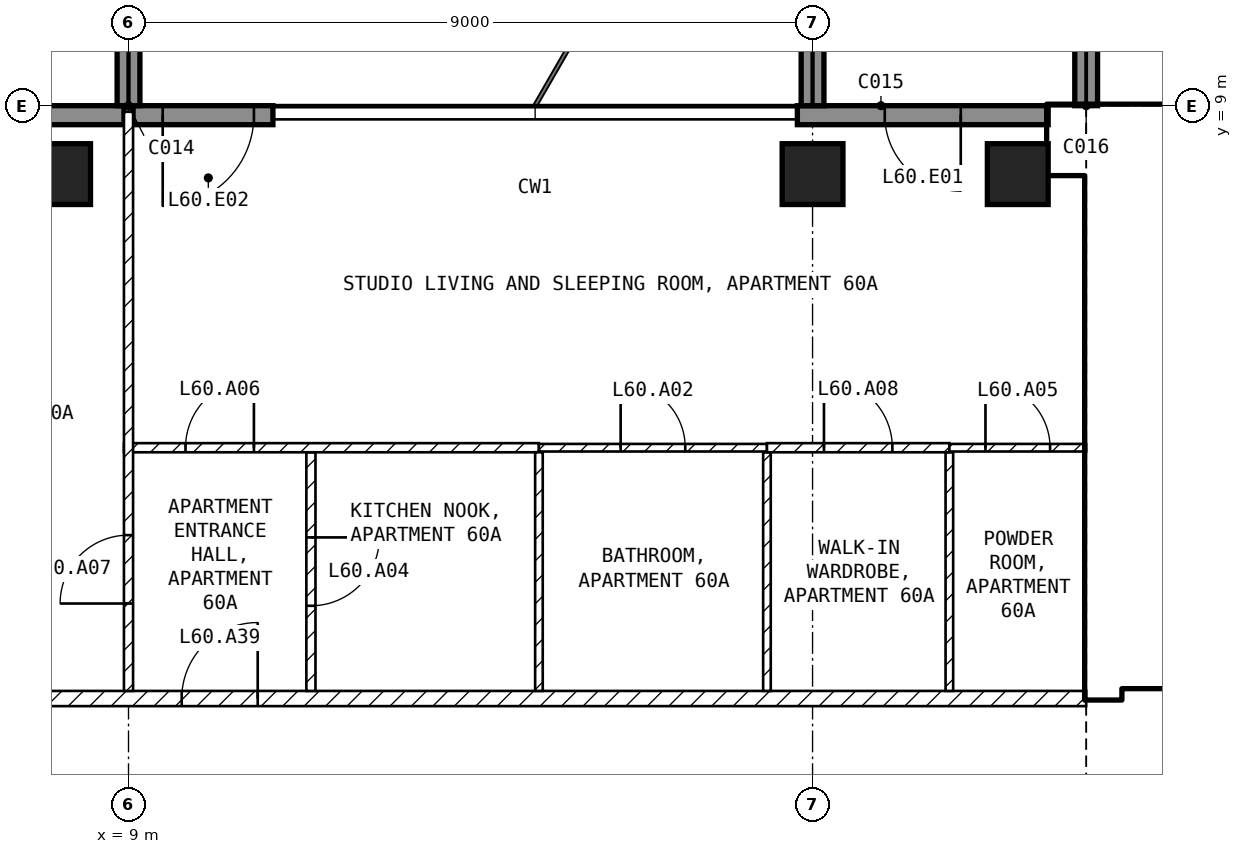
"""IFC4 building model, lengths in metres.
Left out: names, types, materials, properties, quantities, classifications, styles, units other than length and angle.
Written with IfcOpenShell. Run it as: python <this file> out.ifc"""

import sys

from ifc_helpers import new_model, si_unit, direction, frame, frame_2d, origin, origin_2d, place, context, subcontext, project, spatial, rectangle, extrude, element, fill, save


model = new_model("IFC4")
c1 = context("Model", 3, precision=1e-05, world=origin(), true_north=direction((0.0, 1.0)))
c2 = subcontext(c1, "Body", "Model", "MODEL_VIEW")
j1 = project(units=[si_unit("LENGTHUNIT", "METRE"), si_unit("PLANEANGLEUNIT", "RADIAN")], contexts=[c1])
p1 = place(None, origin())
s1 = spatial("IfcSite", under=j1, at=p1, CompositionType="ELEMENT")
p2 = place(p1, origin())
s2 = spatial("IfcBuilding", under=s1, at=p2, CompositionType="ELEMENT")
p3 = place(p2, frame((0.0, 0.0, 239.5)))
s3 = spatial("IfcBuildingStorey", under=s2, at=p3, CompositionType="ELEMENT", Elevation=239.5)
for number, where, z_axis, x_axis in (
    (1, (8.1, 8.1, -0.25), (0.0, 0.0, 1.0), (1.0, 0.0, 0.0)),
    (2, (18.0, 8.1, -0.25), (0.0, 0.0, 1.0), (1.0, 0.0, 0.0)),
    (3, (20.7, 8.1, -0.25), (0.0, 0.0, 1.0), (1.0, 0.0, 0.0)),
):
    element("IfcColumn", number, at=place(p3, frame(where, z_axis=z_axis, x_axis=x_axis)), inside=s3, PredefinedType="COLUMN", context=c2, shape_type="SweptSolid", body=[
        extrude(rectangle(XDim=0.8, YDim=0.8, at=origin_2d()), origin(), (0.0, 0.0, 1.0), 3.5),
    ])
p4 = place(p3, frame((21.1, 8.875, 0.0), z_axis=(0.0, 0.0, 1.0), x_axis=(-1.0, 0.0, 0.0)))
e4 = element("IfcWall", 4, at=p4, inside=s3, PredefinedType="SOLIDWALL", context=c2, shape_type="SweptSolid", body=[
    extrude(rectangle(XDim=3.3, YDim=0.25, at=frame_2d((1.65, 0.0))), origin(), (0.0, 0.0, 1.0), 3.25),
])
p5 = place(p4, frame((1.15, 0.0, 0.0)))
e5 = element("IfcOpeningElement", 5, at=p5, cuts=e4, PredefinedType="OPENING", context=c2, shape_type="SweptSolid", body=[
    extrude(rectangle(XDim=1.0, YDim=2.4, at=frame_2d((0.5, 1.2))), frame((0.0, 0.135, 0.0), z_axis=(0.0, -1.0, 0.0), x_axis=(1.0, 0.0, 0.0)), (0.0, 0.0, 1.0), 0.27),
])
p6 = place(p3, frame((10.9, 8.875, 0.0), z_axis=(0.0, 0.0, 1.0), x_axis=(-1.0, 0.0, 0.0)))
e6 = element("IfcWall", 6, at=p6, inside=s3, PredefinedType="SOLIDWALL", context=c2, shape_type="SweptSolid", body=[
    extrude(rectangle(XDim=1.84, YDim=0.25, at=frame_2d((0.92, 0.0))), origin(), (0.0, 0.0, 1.0), 3.25),
])
p7 = place(p6, frame((0.25, 0.0, 0.0)))
e7 = element("IfcOpeningElement", 7, at=p7, cuts=e6, PredefinedType="OPENING", context=c2, shape_type="SweptSolid", body=[
    extrude(rectangle(XDim=1.2, YDim=2.4, at=frame_2d((0.6, 1.2))), frame((0.0, 0.135, 0.0), z_axis=(0.0, -1.0, 0.0), x_axis=(1.0, 0.0, 0.0)), (0.0, 0.0, 1.0), 0.27),
])
p8 = place(p3, frame((8.94, 8.875, 0.0), z_axis=(0.0, 0.0, 1.0), x_axis=(-1.0, 0.0, 0.0)))
e8 = element("IfcWall", 8, at=p8, inside=s3, PredefinedType="SOLIDWALL", context=c2, shape_type="SweptSolid", body=[
    extrude(rectangle(XDim=3.04, YDim=0.25, at=frame_2d((1.52, 0.0))), origin(), (0.0, 0.0, 1.0), 3.25),
])
p9 = place(p8, frame((1.59, 0.0, 0.0)))
e9 = element("IfcOpeningElement", 9, at=p9, cuts=e8, PredefinedType="OPENING", context=c2, shape_type="SweptSolid", body=[
    extrude(rectangle(XDim=1.2, YDim=2.4, at=frame_2d((0.6, 1.2))), frame((0.0, 0.135, 0.0), z_axis=(0.0, -1.0, 0.0), x_axis=(1.0, 0.0, 0.0)), (0.0, 0.0, 1.0), 0.27),
])
for number, where, z_axis, x_axis in (
    (10, (9.0, 9.0, 0.0), (0.0, 0.0, 1.0), (0.0, 1.0, 0.0)),
    (11, (18.0, 9.0, 0.0), (0.0, 0.0, 1.0), (0.0, 1.0, 0.0)),
    (12, (21.6, 9.0, 0.0), (0.0, 0.0, 1.0), (0.0, 1.0, 0.0)),
):
    element("IfcWall", number, at=place(p3, frame(where, z_axis=z_axis, x_axis=x_axis)), inside=s3, PredefinedType="SOLIDWALL", context=c2, shape_type="SweptSolid", body=[
        extrude(rectangle(XDim=2.7, YDim=0.3, at=frame_2d((1.35, 0.0))), origin(), (0.0, 0.0, 1.0), 3.25),
    ])
p10 = place(p3, frame((21.1, 8.55, 0.0), z_axis=(0.0, 0.0, 1.0), x_axis=(1.0, 0.0, 0.0)))
e13 = element("IfcWall", 13, at=p10, inside=s3, PredefinedType="SHEAR", context=c2, shape_type="SweptSolid", body=[
    extrude(rectangle(XDim=8.65, YDim=0.9, at=frame_2d((4.325, 0.0))), origin(), (0.0, 0.0, 1.0), 3.25),
])
p11 = place(p3, frame((21.825, 1.2, 0.0), z_axis=(0.0, 0.0, 1.0), x_axis=(0.0, 1.0, 0.0)))
e14 = element("IfcWall", 14, at=p11, inside=s3, PredefinedType="SHEAR", context=c2, shape_type="SweptSolid", body=[
    extrude(rectangle(XDim=6.9, YDim=0.45, at=frame_2d((3.45, 0.0))), origin(), (0.0, 0.0, 1.0), 3.25),
])
p12 = place(p3, frame((22.05, 1.45, 0.0), z_axis=(0.0, 0.0, 1.0), x_axis=(1.0, 0.0, 0.0)))
e15 = element("IfcWall", 15, at=p12, inside=s3, PredefinedType="SOLIDWALL", context=c2, shape_type="SweptSolid", body=[
    extrude(rectangle(XDim=11.3, YDim=0.2, at=frame_2d((5.65, 0.0))), origin(), (0.0, 0.0, 1.0), 3.25),
])
p13 = place(p12, frame((0.75, 0.0, 0.0)))
e16 = element("IfcOpeningElement", 16, at=p13, cuts=e15, PredefinedType="OPENING", context=c2, shape_type="SweptSolid", body=[
    extrude(rectangle(XDim=1.0, YDim=2.1, at=frame_2d((0.5, 1.05))), frame((0.0, 0.11, 0.0), z_axis=(0.0, -1.0, 0.0), x_axis=(1.0, 0.0, 0.0)), (0.0, 0.0, 1.0), 0.22),
])
p14 = place(p12, frame((3.25, 0.0, 0.0)))
e17 = element("IfcOpeningElement", 17, at=p14, cuts=e15, PredefinedType="OPENING", context=c2, shape_type="SweptSolid", body=[
    extrude(rectangle(XDim=1.0, YDim=2.1, at=frame_2d((0.5, 1.05))), frame((0.0, 0.11, 0.0), z_axis=(0.0, -1.0, 0.0), x_axis=(1.0, 0.0, 0.0)), (0.0, 0.0, 1.0), 0.22),
])
p15 = place(p12, frame((9.225, 0.0, 0.0)))
e18 = element("IfcOpeningElement", 18, at=p15, cuts=e15, PredefinedType="OPENING", context=c2, shape_type="SweptSolid", body=[
    extrude(rectangle(XDim=0.9, YDim=2.1, at=frame_2d((0.45, 1.05))), frame((0.0, 0.11, 0.0), z_axis=(0.0, -1.0, 0.0), x_axis=(1.0, 0.0, 0.0)), (0.0, 0.0, 1.0), 0.22),
])
p16 = place(p3, frame((22.05, 5.15, 0.0), z_axis=(0.0, 0.0, 1.0), x_axis=(1.0, 0.0, 0.0)))
e19 = element("IfcWall", 19, at=p16, inside=s3, PredefinedType="SOLIDWALL", context=c2, shape_type="SweptSolid", body=[
    extrude(rectangle(XDim=6.3, YDim=0.2, at=frame_2d((3.15, 0.0))), origin(), (0.0, 0.0, 1.0), 3.25),
])
p17 = place(p16, frame((0.2, 0.0, 0.0)))
e20 = element("IfcOpeningElement", 20, at=p17, cuts=e19, PredefinedType="OPENING", context=c2, shape_type="SweptSolid", body=[
    extrude(rectangle(XDim=1.0, YDim=2.1, at=frame_2d((0.5, 1.05))), frame((0.0, 0.11, 0.0), z_axis=(0.0, -1.0, 0.0), x_axis=(1.0, 0.0, 0.0)), (0.0, 0.0, 1.0), 0.22),
])
p18 = place(p3, frame((4.4, 1.2, 0.0), z_axis=(0.0, 0.0, 1.0), x_axis=(1.0, 0.0, 0.0)))
e21 = element("IfcWall", 21, at=p18, inside=s3, PredefinedType="PARTITIONING", context=c2, shape_type="SweptSolid", body=[
    extrude(rectangle(XDim=17.2, YDim=0.2, at=frame_2d((8.6, 0.0))), origin(), (0.0, 0.0, 1.0), 3.25),
])
p19 = place(p18, frame((5.3, 0.0, 0.0)))
e22 = element("IfcOpeningElement", 22, at=p19, cuts=e21, PredefinedType="OPENING", context=c2, shape_type="SweptSolid", body=[
    extrude(rectangle(XDim=1.0, YDim=2.1, at=frame_2d((0.5, 1.05))), frame((0.0, 0.11, 0.0), z_axis=(0.0, -1.0, 0.0), x_axis=(1.0, 0.0, 0.0)), (0.0, 0.0, 1.0), 0.22),
])
p20 = place(p3, frame((11.4, 4.44, 0.0), z_axis=(0.0, 0.0, 1.0), x_axis=(0.0, -1.0, 0.0)))
e23 = element("IfcWall", 23, at=p20, inside=s3, PredefinedType="PARTITIONING", context=c2, shape_type="SweptSolid", body=[
    extrude(rectangle(XDim=3.14, YDim=0.12, at=frame_2d((1.57, 0.0))), origin(), (0.0, 0.0, 1.0), 3.25),
])
p21 = place(p20, frame((1.12, 0.0, 0.0)))
e24 = element("IfcOpeningElement", 24, at=p21, cuts=e23, PredefinedType="OPENING", context=c2, shape_type="SweptSolid", body=[
    extrude(rectangle(XDim=0.9, YDim=2.1, at=frame_2d((0.45, 1.05))), frame((0.0, 0.07, 0.0), z_axis=(0.0, -1.0, 0.0), x_axis=(1.0, 0.0, 0.0)), (0.0, 0.0, 1.0), 0.14),
])
p22 = place(p3, frame((8.94, 4.5, 0.0), z_axis=(0.0, 0.0, 1.0), x_axis=(1.0, 0.0, 0.0)))
e25 = element("IfcWall", 25, at=p22, inside=s3, PredefinedType="PARTITIONING", context=c2, shape_type="SweptSolid", body=[
    extrude(rectangle(XDim=5.46, YDim=0.12, at=frame_2d((2.73, 0.0))), origin(), (0.0, 0.0, 1.0), 3.25),
])
p23 = place(p22, frame((0.81, 0.0, 0.0)))
e26 = element("IfcOpeningElement", 26, at=p23, cuts=e25, PredefinedType="OPENING", context=c2, shape_type="SweptSolid", body=[
    extrude(rectangle(XDim=0.9, YDim=2.1, at=frame_2d((0.45, 1.05))), frame((0.0, 0.07, 0.0), z_axis=(0.0, -1.0, 0.0), x_axis=(1.0, 0.0, 0.0)), (0.0, 0.0, 1.0), 0.14),
])
p24 = place(p3, frame((9.0, 1.3, 0.0), z_axis=(0.0, 0.0, 1.0), x_axis=(0.0, 1.0, 0.0)))
e27 = element("IfcWall", 27, at=p24, inside=s3, PredefinedType="PARTITIONING", context=c2, shape_type="SweptSolid", body=[
    extrude(rectangle(XDim=7.62, YDim=0.12, at=frame_2d((3.81, 0.0))), origin(), (0.0, 0.0, 1.0), 3.25),
])
p25 = place(p24, frame((1.15, 0.0, 0.0)))
e28 = element("IfcOpeningElement", 28, at=p25, cuts=e27, PredefinedType="OPENING", context=c2, shape_type="SweptSolid", body=[
    extrude(rectangle(XDim=0.9, YDim=2.1, at=frame_2d((0.45, 1.05))), frame((0.0, 0.07, 0.0), z_axis=(0.0, -1.0, 0.0), x_axis=(1.0, 0.0, 0.0)), (0.0, 0.0, 1.0), 0.14),
])
for number, where, z_axis, x_axis in (
    (29, (14.4, 4.44, 0.0), (0.0, 0.0, 1.0), (0.0, -1.0, 0.0)),
    (30, (17.4, 4.44, 0.0), (0.0, 0.0, 1.0), (0.0, -1.0, 0.0)),
):
    element("IfcWall", number, at=place(p3, frame(where, z_axis=z_axis, x_axis=x_axis)), inside=s3, PredefinedType="PARTITIONING", context=c2, shape_type="SweptSolid", body=[
        extrude(rectangle(XDim=3.14, YDim=0.1, at=frame_2d((1.57, 0.0))), origin(), (0.0, 0.0, 1.0), 3.25),
    ])
p26 = place(p3, frame((14.4, 4.5, 0.0), z_axis=(0.0, 0.0, 1.0), x_axis=(1.0, 0.0, 0.0)))
e31 = element("IfcWall", 31, at=p26, inside=s3, PredefinedType="PARTITIONING", context=c2, shape_type="SweptSolid", body=[
    extrude(rectangle(XDim=3.0, YDim=0.1, at=frame_2d((1.5, 0.0))), origin(), (0.0, 0.0, 1.0), 3.25),
])
p27 = place(p26, frame((1.075, 0.0, 0.0)))
e32 = element("IfcOpeningElement", 32, at=p27, cuts=e31, PredefinedType="OPENING", context=c2, shape_type="SweptSolid", body=[
    extrude(rectangle(XDim=0.85, YDim=2.1, at=frame_2d((0.425, 1.05))), frame((0.0, 0.06, 0.0), z_axis=(0.0, -1.0, 0.0), x_axis=(1.0, 0.0, 0.0)), (0.0, 0.0, 1.0), 0.12),
])
p28 = place(p3, frame((19.8, 4.44, 0.0), z_axis=(0.0, 0.0, 1.0), x_axis=(0.0, -1.0, 0.0)))
e33 = element("IfcWall", 33, at=p28, inside=s3, PredefinedType="PARTITIONING", context=c2, shape_type="SweptSolid", body=[
    extrude(rectangle(XDim=3.14, YDim=0.1, at=frame_2d((1.57, 0.0))), origin(), (0.0, 0.0, 1.0), 3.25),
])
p29 = place(p3, frame((17.4, 4.5, 0.0), z_axis=(0.0, 0.0, 1.0), x_axis=(1.0, 0.0, 0.0)))
e34 = element("IfcWall", 34, at=p29, inside=s3, PredefinedType="PARTITIONING", context=c2, shape_type="SweptSolid", body=[
    extrude(rectangle(XDim=2.4, YDim=0.12, at=frame_2d((1.2, 0.0))), origin(), (0.0, 0.0, 1.0), 3.25),
])
p30 = place(p29, frame((0.75, 0.0, 0.0)))
e35 = element("IfcOpeningElement", 35, at=p30, cuts=e34, PredefinedType="OPENING", context=c2, shape_type="SweptSolid", body=[
    extrude(rectangle(XDim=0.9, YDim=2.1, at=frame_2d((0.45, 1.05))), frame((0.0, 0.07, 0.0), z_axis=(0.0, -1.0, 0.0), x_axis=(1.0, 0.0, 0.0)), (0.0, 0.0, 1.0), 0.14),
])
p31 = place(p3, frame((19.8, 4.5, 0.0), z_axis=(0.0, 0.0, 1.0), x_axis=(1.0, 0.0, 0.0)))
e36 = element("IfcWall", 36, at=p31, inside=s3, PredefinedType="PARTITIONING", context=c2, shape_type="SweptSolid", body=[
    extrude(rectangle(XDim=1.8, YDim=0.1, at=frame_2d((0.9, 0.0))), origin(), (0.0, 0.0, 1.0), 3.25),
])
p32 = place(p31, frame((0.475, 0.0, 0.0)))
e37 = element("IfcOpeningElement", 37, at=p32, cuts=e36, PredefinedType="OPENING", context=c2, shape_type="SweptSolid", body=[
    extrude(rectangle(XDim=0.85, YDim=2.1, at=frame_2d((0.425, 1.05))), frame((0.0, 0.06, 0.0), z_axis=(0.0, -1.0, 0.0), x_axis=(1.0, 0.0, 0.0)), (0.0, 0.0, 1.0), 0.12),
])
p33 = place(p5, origin())
e38 = element("IfcDoor", 38, at=p33, inside=s3, OperationType="SINGLE_SWING_LEFT", PredefinedType="DOOR", context=c2, shape_type="SweptSolid", body=[
    extrude(rectangle(XDim=1.0, YDim=2.4, at=frame_2d((0.5, 1.2))), frame((0.0, 0.025, 0.0), z_axis=(0.0, -1.0, 0.0), x_axis=(1.0, 0.0, 0.0)), (0.0, 0.0, 1.0), 0.05),
])
fill(e5, e38)
p34 = place(p7, origin())
e39 = element("IfcDoor", 39, at=p34, inside=s3, OperationType="SINGLE_SWING_RIGHT", PredefinedType="DOOR", context=c2, shape_type="SweptSolid", body=[
    extrude(rectangle(XDim=1.2, YDim=2.4, at=frame_2d((0.6, 1.2))), frame((0.0, 0.025, 0.0), z_axis=(0.0, -1.0, 0.0), x_axis=(1.0, 0.0, 0.0)), (0.0, 0.0, 1.0), 0.05),
])
fill(e7, e39)
p35 = place(p17, origin())
e40 = element("IfcDoor", 40, at=p35, inside=s3, OperationType="SINGLE_SWING_LEFT", PredefinedType="DOOR", context=c2, shape_type="SweptSolid", body=[
    extrude(rectangle(XDim=1.0, YDim=2.1, at=frame_2d((0.5, 1.05))), frame((0.0, 0.025, 0.0), z_axis=(0.0, -1.0, 0.0), x_axis=(1.0, 0.0, 0.0)), (0.0, 0.0, 1.0), 0.05),
])
fill(e20, e40)
p36 = place(p27, origin())
e41 = element("IfcDoor", 41, at=p36, inside=s3, OperationType="SINGLE_SWING_LEFT", PredefinedType="DOOR", context=c2, shape_type="SweptSolid", body=[
    extrude(rectangle(XDim=0.85, YDim=2.1, at=frame_2d((0.425, 1.05))), frame((0.0, 0.025, 0.0), z_axis=(0.0, -1.0, 0.0), x_axis=(1.0, 0.0, 0.0)), (0.0, 0.0, 1.0), 0.05),
])
fill(e32, e41)
p37 = place(p21, origin())
e42 = element("IfcDoor", 42, at=p37, inside=s3, OperationType="SINGLE_SWING_LEFT", PredefinedType="DOOR", context=c2, shape_type="SweptSolid", body=[
    extrude(rectangle(XDim=0.9, YDim=2.1, at=frame_2d((0.45, 1.05))), frame((0.0, 0.025, 0.0), z_axis=(0.0, -1.0, 0.0), x_axis=(1.0, 0.0, 0.0)), (0.0, 0.0, 1.0), 0.05),
])
fill(e24, e42)
p38 = place(p32, origin())
e43 = element("IfcDoor", 43, at=p38, inside=s3, OperationType="SINGLE_SWING_LEFT", PredefinedType="DOOR", context=c2, shape_type="SweptSolid", body=[
    extrude(rectangle(XDim=0.85, YDim=2.1, at=frame_2d((0.425, 1.05))), frame((0.0, 0.025, 0.0), z_axis=(0.0, -1.0, 0.0), x_axis=(1.0, 0.0, 0.0)), (0.0, 0.0, 1.0), 0.05),
])
fill(e37, e43)
p39 = place(p23, origin())
e44 = element("IfcDoor", 44, at=p39, inside=s3, OperationType="SINGLE_SWING_RIGHT", PredefinedType="DOOR", context=c2, shape_type="SweptSolid", body=[
    extrude(rectangle(XDim=0.9, YDim=2.1, at=frame_2d((0.45, 1.05))), frame((0.0, 0.025, 0.0), z_axis=(0.0, -1.0, 0.0), x_axis=(1.0, 0.0, 0.0)), (0.0, 0.0, 1.0), 0.05),
])
fill(e26, e44)
p40 = place(p25, origin())
e45 = element("IfcDoor", 45, at=p40, inside=s3, OperationType="SINGLE_SWING_LEFT", PredefinedType="DOOR", context=c2, shape_type="SweptSolid", body=[
    extrude(rectangle(XDim=0.9, YDim=2.1, at=frame_2d((0.45, 1.05))), frame((0.0, 0.025, 0.0), z_axis=(0.0, -1.0, 0.0), x_axis=(1.0, 0.0, 0.0)), (0.0, 0.0, 1.0), 0.05),
])
fill(e28, e45)
p41 = place(p30, origin())
e46 = element("IfcDoor", 46, at=p41, inside=s3, OperationType="SINGLE_SWING_LEFT", PredefinedType="DOOR", context=c2, shape_type="SweptSolid", body=[
    extrude(rectangle(XDim=0.9, YDim=2.1, at=frame_2d((0.45, 1.05))), frame((0.0, 0.025, 0.0), z_axis=(0.0, -1.0, 0.0), x_axis=(1.0, 0.0, 0.0)), (0.0, 0.0, 1.0), 0.05),
])
fill(e35, e46)
p42 = place(p19, origin())
e47 = element("IfcDoor", 47, at=p42, inside=s3, OperationType="SINGLE_SWING_RIGHT", PredefinedType="DOOR", context=c2, shape_type="SweptSolid", body=[
    extrude(rectangle(XDim=1.0, YDim=2.1, at=frame_2d((0.5, 1.05))), frame((0.0, 0.025, 0.0), z_axis=(0.0, -1.0, 0.0), x_axis=(1.0, 0.0, 0.0)), (0.0, 0.0, 1.0), 0.05),
])
fill(e22, e47)
save(model, sys.argv[1])
